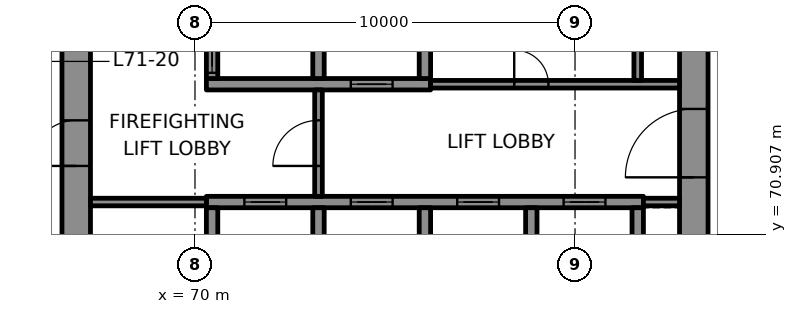
"""IFC4 building model, lengths in metres.
Left out: names, types, materials, properties, quantities, classifications, styles, units other than length and angle.
Written with IfcOpenShell. Run it as: python <this file> out.ifc"""

import sys

from ifc_helpers import new_model, si_unit, direction, frame, frame_2d, origin, place, context, subcontext, project, spatial, rectangle, extrude, element, fill, save


model = new_model("IFC4")
c1 = context("Model", 3, precision=1e-05, world=origin(), true_north=direction((0.0, 1.0)))
c2 = subcontext(c1, "Body", "Model", "MODEL_VIEW")
j1 = project(units=[si_unit("LENGTHUNIT", "METRE"), si_unit("PLANEANGLEUNIT", "RADIAN")], contexts=[c1])
p1 = place(None, origin())
s1 = spatial("IfcSite", under=j1, at=p1, CompositionType="ELEMENT")
p2 = place(p1, origin())
s2 = spatial("IfcBuilding", under=s1, at=p2, CompositionType="ELEMENT")
p3 = place(p2, frame((0.0, 0.0, 295.1)))
s3 = spatial("IfcBuildingStorey", under=s2, at=p3, CompositionType="ELEMENT", Elevation=295.1)
p4 = place(p3, frame((66.875, 69.0, 0.0), z_axis=(0.0, 0.0, 1.0), x_axis=(0.0, 1.0, 0.0)))
e1 = element("IfcWall", 1, at=p4, inside=s3, PredefinedType="SHEAR", context=c2, shape_type="SweptSolid", body=[
    extrude(rectangle(XDim=12.0, YDim=0.75, at=frame_2d((6.0, 0.0))), origin(), (0.0, 0.0, 1.0), 3.3),
])
p5 = place(p4, frame((3.7, 0.0, 0.0)))
e2 = element("IfcOpeningElement", 2, at=p5, cuts=e1, PredefinedType="OPENING", context=c2, shape_type="SweptSolid", body=[
    extrude(rectangle(XDim=1.2, YDim=2.1, at=frame_2d((0.6, 1.05))), frame((0.0, 0.385, 0.0), z_axis=(0.0, -1.0, 0.0), x_axis=(1.0, 0.0, 0.0)), (0.0, 0.0, 1.0), 0.77),
])
p6 = place(p3, frame((83.125, 69.0, 0.0), z_axis=(0.0, 0.0, 1.0), x_axis=(0.0, 1.0, 0.0)))
e3 = element("IfcWall", 3, at=p6, inside=s3, PredefinedType="SHEAR", context=c2, shape_type="SweptSolid", body=[
    extrude(rectangle(XDim=12.0, YDim=0.75, at=frame_2d((6.0, 0.0))), origin(), (0.0, 0.0, 1.0), 3.3),
])
p7 = place(p6, frame((3.4, 0.0, 0.0)))
e4 = element("IfcOpeningElement", 4, at=p7, cuts=e3, PredefinedType="OPENING", context=c2, shape_type="SweptSolid", body=[
    extrude(rectangle(XDim=1.8, YDim=2.1, at=frame_2d((0.9, 1.05))), frame((0.0, 0.385, 0.0), z_axis=(0.0, -1.0, 0.0), x_axis=(1.0, 0.0, 0.0)), (0.0, 0.0, 1.0), 0.77),
])
p8 = place(p3, frame((70.3, 71.75, 0.0), z_axis=(0.0, 0.0, 1.0), x_axis=(1.0, 0.0, 0.0)))
e5 = element("IfcWall", 5, at=p8, inside=s3, PredefinedType="SHEAR", context=c2, shape_type="SweptSolid", body=[
    extrude(rectangle(XDim=11.5, YDim=0.3, at=frame_2d((5.75, 0.0))), origin(), (0.0, 0.0, 1.0), 3.3),
])
p9 = place(p8, frame((1.0, 0.0, 0.0)))
e6 = element("IfcOpeningElement", 6, at=p9, cuts=e5, PredefinedType="OPENING", context=c2, shape_type="SweptSolid", body=[
    extrude(rectangle(XDim=1.1, YDim=2.1, at=frame_2d((0.55, 1.05))), frame((0.0, 0.16, 0.0), z_axis=(0.0, -1.0, 0.0), x_axis=(1.0, 0.0, 0.0)), (0.0, 0.0, 1.0), 0.32),
])
p10 = place(p8, frame((3.8, 0.0, 0.0)))
e7 = element("IfcOpeningElement", 7, at=p10, cuts=e5, PredefinedType="OPENING", context=c2, shape_type="SweptSolid", body=[
    extrude(rectangle(XDim=1.1, YDim=2.1, at=frame_2d((0.55, 1.05))), frame((0.0, 0.16, 0.0), z_axis=(0.0, -1.0, 0.0), x_axis=(1.0, 0.0, 0.0)), (0.0, 0.0, 1.0), 0.32),
])
p11 = place(p8, frame((6.6, 0.0, 0.0)))
e8 = element("IfcOpeningElement", 8, at=p11, cuts=e5, PredefinedType="OPENING", context=c2, shape_type="SweptSolid", body=[
    extrude(rectangle(XDim=1.1, YDim=2.1, at=frame_2d((0.55, 1.05))), frame((0.0, 0.16, 0.0), z_axis=(0.0, -1.0, 0.0), x_axis=(1.0, 0.0, 0.0)), (0.0, 0.0, 1.0), 0.32),
])
p12 = place(p8, frame((9.4, 0.0, 0.0)))
e9 = element("IfcOpeningElement", 9, at=p12, cuts=e5, PredefinedType="OPENING", context=c2, shape_type="SweptSolid", body=[
    extrude(rectangle(XDim=1.1, YDim=2.1, at=frame_2d((0.55, 1.05))), frame((0.0, 0.16, 0.0), z_axis=(0.0, -1.0, 0.0), x_axis=(1.0, 0.0, 0.0)), (0.0, 0.0, 1.0), 0.32),
])
p13 = place(p3, frame((70.3, 74.85, 0.0), z_axis=(0.0, 0.0, 1.0), x_axis=(1.0, 0.0, 0.0)))
e10 = element("IfcWall", 10, at=p13, inside=s3, PredefinedType="SHEAR", context=c2, shape_type="SweptSolid", body=[
    extrude(rectangle(XDim=5.9, YDim=0.3, at=frame_2d((2.95, 0.0))), origin(), (0.0, 0.0, 1.0), 3.3),
])
p14 = place(p13, frame((3.8, 0.0, 0.0)))
e11 = element("IfcOpeningElement", 11, at=p14, cuts=e10, PredefinedType="OPENING", context=c2, shape_type="SweptSolid", body=[
    extrude(rectangle(XDim=1.1, YDim=2.1, at=frame_2d((0.55, 1.05))), frame((0.0, 0.16, 0.0), z_axis=(0.0, -1.0, 0.0), x_axis=(1.0, 0.0, 0.0)), (0.0, 0.0, 1.0), 0.32),
])
p15 = place(p3, frame((70.45, 69.0, 0.0), z_axis=(0.0, 0.0, 1.0), x_axis=(0.0, 1.0, 0.0)))
e12 = element("IfcWall", 12, at=p15, inside=s3, PredefinedType="SHEAR", context=c2, shape_type="SweptSolid", body=[
    extrude(rectangle(XDim=2.6, YDim=0.3, at=frame_2d((1.3, 0.0))), origin(), (0.0, 0.0, 1.0), 3.3),
])
p16 = place(p3, frame((70.45, 75.0, 0.0), z_axis=(0.0, 0.0, 1.0), x_axis=(0.0, 1.0, 0.0)))
e13 = element("IfcWall", 13, at=p16, inside=s3, PredefinedType="SHEAR", context=c2, shape_type="SweptSolid", body=[
    extrude(rectangle(XDim=2.6, YDim=0.3, at=frame_2d((1.3, 0.0))), origin(), (0.0, 0.0, 1.0), 3.3),
])
p17 = place(p16, frame((0.15, 0.0, 0.0)))
e14 = element("IfcOpeningElement", 14, at=p17, cuts=e13, PredefinedType="OPENING", context=c2, shape_type="SweptSolid", body=[
    extrude(rectangle(XDim=1.1, YDim=2.1, at=frame_2d((0.55, 1.05))), frame((0.0, 0.16, 0.0), z_axis=(0.0, -1.0, 0.0), x_axis=(1.0, 0.0, 0.0)), (0.0, 0.0, 1.0), 0.32),
])
for number, where, z_axis, x_axis in (
    (15, (73.25, 69.0, 0.0), (0.0, 0.0, 1.0), (0.0, 1.0, 0.0)),
    (16, (73.25, 75.0, 0.0), (0.0, 0.0, 1.0), (0.0, 1.0, 0.0)),
    (17, (76.05, 69.0, 0.0), (0.0, 0.0, 1.0), (0.0, 1.0, 0.0)),
    (18, (76.05, 75.0, 0.0), (0.0, 0.0, 1.0), (0.0, 1.0, 0.0)),
    (19, (78.85, 69.0, 0.0), (0.0, 0.0, 1.0), (0.0, 1.0, 0.0)),
    (20, (81.65, 69.0, 0.0), (0.0, 0.0, 1.0), (0.0, 1.0, 0.0)),
):
    element("IfcWall", number, at=place(p3, frame(where, z_axis=z_axis, x_axis=x_axis)), inside=s3, PredefinedType="SHEAR", context=c2, shape_type="SweptSolid", body=[
        extrude(rectangle(XDim=2.6, YDim=0.3, at=frame_2d((1.3, 0.0))), origin(), (0.0, 0.0, 1.0), 3.3),
    ])
p18 = place(p3, frame((67.25, 71.75, 0.0), z_axis=(0.0, 0.0, 1.0), x_axis=(1.0, 0.0, 0.0)))
e21 = element("IfcWall", 21, at=p18, inside=s3, PredefinedType="PARTITIONING", context=c2, shape_type="SweptSolid", body=[
    extrude(rectangle(XDim=3.05, YDim=0.2, at=frame_2d((1.525, 0.0))), origin(), (0.0, 0.0, 1.0), 3.3),
])
p19 = place(p3, frame((81.8, 71.75, 0.0), z_axis=(0.0, 0.0, 1.0), x_axis=(1.0, 0.0, 0.0)))
e22 = element("IfcWall", 22, at=p19, inside=s3, PredefinedType="PARTITIONING", context=c2, shape_type="SweptSolid", body=[
    extrude(rectangle(XDim=0.95, YDim=0.2, at=frame_2d((0.475, 0.0))), origin(), (0.0, 0.0, 1.0), 3.3),
])
p20 = place(p3, frame((76.2, 74.85, 0.0), z_axis=(0.0, 0.0, 1.0), x_axis=(1.0, 0.0, 0.0)))
e23 = element("IfcWall", 23, at=p20, inside=s3, PredefinedType="PARTITIONING", context=c2, shape_type="SweptSolid", body=[
    extrude(rectangle(XDim=6.55, YDim=0.2, at=frame_2d((3.275, 0.0))), origin(), (0.0, 0.0, 1.0), 3.3),
])
p21 = place(p20, frame((2.2, 0.0, 0.0)))
e24 = element("IfcOpeningElement", 24, at=p21, cuts=e23, PredefinedType="OPENING", context=c2, shape_type="SweptSolid", body=[
    extrude(rectangle(XDim=0.9, YDim=2.1, at=frame_2d((0.45, 1.05))), frame((0.0, 0.11, 0.0), z_axis=(0.0, -1.0, 0.0), x_axis=(1.0, 0.0, 0.0)), (0.0, 0.0, 1.0), 0.22),
])
p22 = place(p3, frame((73.25, 71.9, 0.0), z_axis=(0.0, 0.0, 1.0), x_axis=(0.0, 1.0, 0.0)))
e25 = element("IfcWall", 25, at=p22, inside=s3, PredefinedType="PARTITIONING", context=c2, shape_type="SweptSolid", body=[
    extrude(rectangle(XDim=2.8, YDim=0.2, at=frame_2d((1.4, 0.0))), origin(), (0.0, 0.0, 1.0), 3.3),
])
p23 = place(p22, frame((0.8, 0.0, 0.0)))
e26 = element("IfcOpeningElement", 26, at=p23, cuts=e25, PredefinedType="OPENING", context=c2, shape_type="SweptSolid", body=[
    extrude(rectangle(XDim=1.2, YDim=2.1, at=frame_2d((0.6, 1.05))), frame((0.0, 0.11, 0.0), z_axis=(0.0, -1.0, 0.0), x_axis=(1.0, 0.0, 0.0)), (0.0, 0.0, 1.0), 0.22),
])
p24 = place(p3, frame((81.65, 74.95, 0.0), z_axis=(0.0, 0.0, 1.0), x_axis=(0.0, 1.0, 0.0)))
e27 = element("IfcWall", 27, at=p24, inside=s3, PredefinedType="PARTITIONING", context=c2, shape_type="SweptSolid", body=[
    extrude(rectangle(XDim=2.65, YDim=0.2, at=frame_2d((1.325, 0.0))), origin(), (0.0, 0.0, 1.0), 3.3),
])
p25 = place(p9, origin())
e28 = element("IfcDoor", 28, at=p25, inside=s3, OperationType="DOUBLE_DOOR_SLIDING", PredefinedType="DOOR", context=c2, shape_type="SweptSolid", body=[
    extrude(rectangle(XDim=1.1, YDim=2.1, at=frame_2d((0.55, 1.05))), frame((0.0, 0.025, 0.0), z_axis=(0.0, -1.0, 0.0), x_axis=(1.0, 0.0, 0.0)), (0.0, 0.0, 1.0), 0.05),
])
fill(e6, e28)
p26 = place(p10, origin())
e29 = element("IfcDoor", 29, at=p26, inside=s3, OperationType="DOUBLE_DOOR_SLIDING", PredefinedType="DOOR", context=c2, shape_type="SweptSolid", body=[
    extrude(rectangle(XDim=1.1, YDim=2.1, at=frame_2d((0.55, 1.05))), frame((0.0, 0.025, 0.0), z_axis=(0.0, -1.0, 0.0), x_axis=(1.0, 0.0, 0.0)), (0.0, 0.0, 1.0), 0.05),
])
fill(e7, e29)
p27 = place(p11, origin())
e30 = element("IfcDoor", 30, at=p27, inside=s3, OperationType="DOUBLE_DOOR_SLIDING", PredefinedType="DOOR", context=c2, shape_type="SweptSolid", body=[
    extrude(rectangle(XDim=1.1, YDim=2.1, at=frame_2d((0.55, 1.05))), frame((0.0, 0.025, 0.0), z_axis=(0.0, -1.0, 0.0), x_axis=(1.0, 0.0, 0.0)), (0.0, 0.0, 1.0), 0.05),
])
fill(e8, e30)
p28 = place(p12, origin())
e31 = element("IfcDoor", 31, at=p28, inside=s3, OperationType="DOUBLE_DOOR_SLIDING", PredefinedType="DOOR", context=c2, shape_type="SweptSolid", body=[
    extrude(rectangle(XDim=1.1, YDim=2.1, at=frame_2d((0.55, 1.05))), frame((0.0, 0.025, 0.0), z_axis=(0.0, -1.0, 0.0), x_axis=(1.0, 0.0, 0.0)), (0.0, 0.0, 1.0), 0.05),
])
fill(e9, e31)
p29 = place(p17, origin())
e32 = element("IfcDoor", 32, at=p29, inside=s3, OperationType="DOUBLE_DOOR_SLIDING", PredefinedType="DOOR", context=c2, shape_type="SweptSolid", body=[
    extrude(rectangle(XDim=1.1, YDim=2.1, at=frame_2d((0.55, 1.05))), frame((0.0, 0.025, 0.0), z_axis=(0.0, -1.0, 0.0), x_axis=(1.0, 0.0, 0.0)), (0.0, 0.0, 1.0), 0.05),
])
fill(e14, e32)
p30 = place(p14, origin())
e33 = element("IfcDoor", 33, at=p30, inside=s3, OperationType="DOUBLE_DOOR_SLIDING", PredefinedType="DOOR", context=c2, shape_type="SweptSolid", body=[
    extrude(rectangle(XDim=1.1, YDim=2.1, at=frame_2d((0.55, 1.05))), frame((0.0, 0.025, 0.0), z_axis=(0.0, -1.0, 0.0), x_axis=(1.0, 0.0, 0.0)), (0.0, 0.0, 1.0), 0.05),
])
fill(e11, e33)
p31 = place(p23, origin())
e34 = element("IfcDoor", 34, at=p31, inside=s3, OperationType="SINGLE_SWING_LEFT", PredefinedType="DOOR", context=c2, shape_type="SweptSolid", body=[
    extrude(rectangle(XDim=1.2, YDim=2.1, at=frame_2d((0.6, 1.05))), frame((0.0, 0.025, 0.0), z_axis=(0.0, -1.0, 0.0), x_axis=(1.0, 0.0, 0.0)), (0.0, 0.0, 1.0), 0.05),
])
fill(e26, e34)
p32 = place(p5, origin())
e35 = element("IfcDoor", 35, at=p32, inside=s3, OperationType="SINGLE_SWING_RIGHT", PredefinedType="DOOR", context=c2, shape_type="SweptSolid", body=[
    extrude(rectangle(XDim=1.2, YDim=2.1, at=frame_2d((0.6, 1.05))), frame((0.0, 0.095, 0.0), z_axis=(0.0, -1.0, 0.0), x_axis=(1.0, 0.0, 0.0)), (0.0, 0.0, 1.0), 0.19),
])
fill(e2, e35)
p33 = place(p7, origin())
e36 = element("IfcDoor", 36, at=p33, inside=s3, OperationType="SINGLE_SWING_LEFT", PredefinedType="DOOR", context=c2, shape_type="SweptSolid", body=[
    extrude(rectangle(XDim=1.8, YDim=2.1, at=frame_2d((0.9, 1.05))), frame((0.0, 0.095, 0.0), z_axis=(0.0, -1.0, 0.0), x_axis=(1.0, 0.0, 0.0)), (0.0, 0.0, 1.0), 0.19),
])
fill(e4, e36)
p34 = place(p21, origin())
e37 = element("IfcDoor", 37, at=p34, inside=s3, OperationType="SINGLE_SWING_LEFT", PredefinedType="DOOR", context=c2, shape_type="SweptSolid", body=[
    extrude(rectangle(XDim=0.9, YDim=2.1, at=frame_2d((0.45, 1.05))), frame((0.0, 0.025, 0.0), z_axis=(0.0, -1.0, 0.0), x_axis=(1.0, 0.0, 0.0)), (0.0, 0.0, 1.0), 0.05),
])
fill(e24, e37)
save(model, sys.argv[1])
